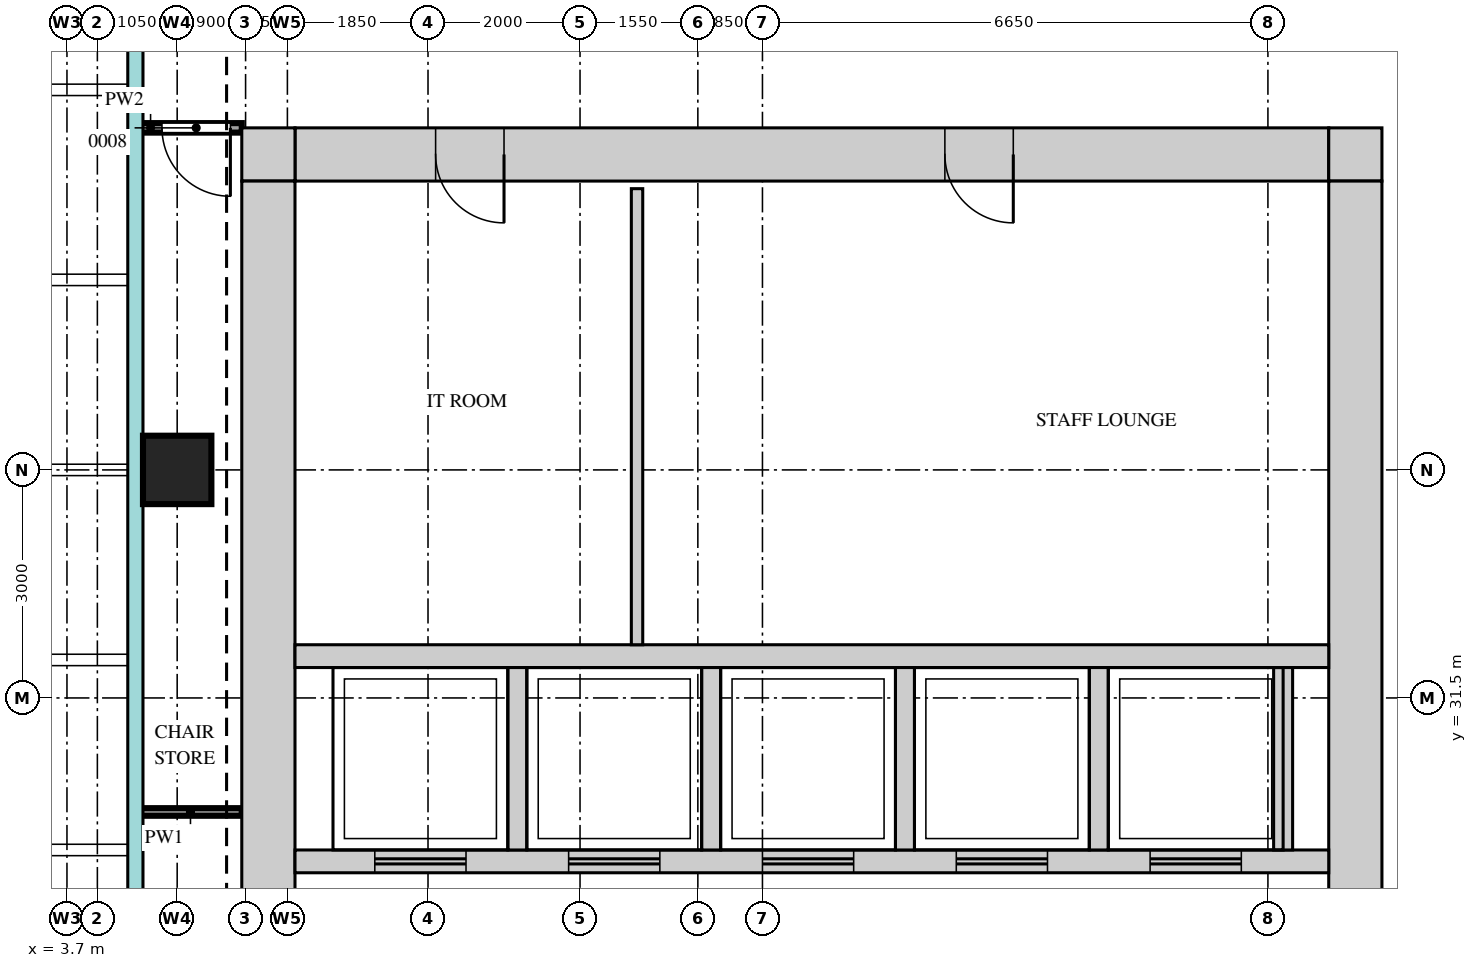
"""IFC4 building model, lengths in metres.
Left out: names, types, materials, properties, quantities, classifications, styles, units other than length and angle.
Written with IfcOpenShell. Run it as: python <this file> out.ifc"""

import sys

from ifc_helpers import new_model, si_unit, direction, frame, frame_2d, origin, origin_2d, place, context, subcontext, project, spatial, rectangle, extrude, source, transform, mapped, element, fill, save


model = new_model("IFC4")
c1 = context("Model", 3, precision=1e-05, world=origin(), true_north=direction((0.0, 1.0)))
c2 = subcontext(c1, "Body", "Model", "MODEL_VIEW")
j1 = project(units=[si_unit("LENGTHUNIT", "METRE"), si_unit("PLANEANGLEUNIT", "RADIAN")], contexts=[c1])
p1 = place(None, origin())
s1 = spatial("IfcSite", under=j1, at=p1, CompositionType="ELEMENT")
p2 = place(p1, origin())
s2 = spatial("IfcBuilding", under=s1, at=p2, CompositionType="ELEMENT")
p3 = place(p2, frame((0.0, 0.0, 258.2)))
s3 = spatial("IfcBuildingStorey", under=s2, at=p3, CompositionType="ELEMENT", Elevation=258.2)
m1 = source(origin(), c2, "Body", "SweptSolid", [
    extrude(rectangle(XDim=13.6, YDim=0.7, at=frame_2d((6.8, 0.0))), origin(), (0.0, 0.0, 1.0), 3.75),
])
p4 = place(p3, frame((6.7, 38.65, 0.0), z_axis=(0.0, 0.0, 1.0), x_axis=(1.0, 0.0, 0.0)))
e1 = element("IfcWall", 1, at=p4, inside=s3, PredefinedType="SHEAR", context=c2, shape_type="MappedRepresentation", body=[
    mapped(m1, transform((0.0, 0.0, 0.0))),
])
m2 = source(origin(), c2, "Body", "SweptSolid", [
    extrude(rectangle(XDim=0.9, YDim=2.1, at=frame_2d((0.45, 1.05))), frame((0.0, 0.36, 0.0), z_axis=(0.0, -1.0, 0.0), x_axis=(1.0, 0.0, 0.0)), (0.0, 0.0, 1.0), 0.72),
])
p5 = place(p4, frame((1.85, 0.0, 0.0)))
e2 = element("IfcOpeningElement", 2, at=p5, cuts=e1, PredefinedType="OPENING", context=c2, shape_type="MappedRepresentation", body=[
    mapped(m2, transform((0.0, 0.0, 0.0))),
])
p6 = place(p4, frame((8.55, 0.0, 0.0)))
e3 = element("IfcOpeningElement", 3, at=p6, cuts=e1, PredefinedType="OPENING", context=c2, shape_type="MappedRepresentation", body=[
    mapped(m2, transform((0.0, 0.0, 0.0))),
])
m3 = source(origin(), c2, "Body", "SweptSolid", [
    extrude(rectangle(XDim=0.7, YDim=0.7, at=frame_2d((0.35, 0.0))), origin(), (0.0, 0.0, 1.0), 3.75),
])
for number, where, z_axis, x_axis in (
    (4, (20.3, 38.65, 0.0), (0.0, 0.0, 1.0), (1.0, 0.0, 0.0)),
    (5, (6.0, 38.65, 0.0), (0.0, 0.0, 1.0), (1.0, 0.0, 0.0)),
):
    element("IfcWall", number, at=place(p3, frame(where, z_axis=z_axis, x_axis=x_axis)), inside=s3, PredefinedType="SHEAR", context=c2, shape_type="MappedRepresentation", body=[
        mapped(m3, transform((0.0, 0.0, 0.0))),
    ])
m4 = source(origin(), c2, "Body", "SweptSolid", [
    extrude(rectangle(XDim=22.6, YDim=0.7, at=frame_2d((11.3, 0.0))), origin(), (0.0, 0.0, 1.0), 3.75),
])
p7 = place(p3, frame((20.65, 15.7, 0.0), z_axis=(0.0, 0.0, 1.0), x_axis=(0.0, 1.0, 0.0)))
e6 = element("IfcWall", 6, at=p7, inside=s3, PredefinedType="SHEAR", context=c2, shape_type="MappedRepresentation", body=[
    mapped(m4, transform((0.0, 0.0, 0.0))),
])
m5 = source(origin(), c2, "Body", "SweptSolid", [
    extrude(rectangle(XDim=1.8, YDim=2.1, at=frame_2d((0.9, 1.05))), frame((0.0, 0.36, 0.0), z_axis=(0.0, -1.0, 0.0), x_axis=(1.0, 0.0, 0.0)), (0.0, 0.0, 1.0), 0.72),
])
p8 = place(p7, frame((10.8, 0.0, 0.0)))
e7 = element("IfcOpeningElement", 7, at=p8, cuts=e6, PredefinedType="OPENING", context=c2, shape_type="MappedRepresentation", body=[
    mapped(m5, transform((0.0, 0.0, 0.0))),
])
p9 = place(p7, frame((0.45, 0.0, 0.0)))
e8 = element("IfcOpeningElement", 8, at=p9, cuts=e6, PredefinedType="OPENING", context=c2, shape_type="MappedRepresentation", body=[
    mapped(m2, transform((0.0, 0.0, 0.0))),
])
p10 = place(p7, frame((2.25, 0.0, 0.0)))
e9 = element("IfcOpeningElement", 9, at=p10, cuts=e6, PredefinedType="OPENING", context=c2, shape_type="MappedRepresentation", body=[
    mapped(m2, transform((0.0, 0.0, 0.0))),
])
m6 = source(origin(), c2, "Body", "SweptSolid", [
    extrude(rectangle(XDim=1.0, YDim=2.1, at=frame_2d((0.5, 1.05))), frame((0.0, 0.36, 0.0), z_axis=(0.0, -1.0, 0.0), x_axis=(1.0, 0.0, 0.0)), (0.0, 0.0, 1.0), 0.72),
])
p11 = place(p7, frame((4.95, 0.0, 0.0)))
e10 = element("IfcOpeningElement", 10, at=p11, cuts=e6, PredefinedType="OPENING", context=c2, shape_type="MappedRepresentation", body=[
    mapped(m6, transform((0.0, 0.0, 0.0))),
])
p12 = place(p3, frame((6.35, 15.7, 0.0), z_axis=(0.0, 0.0, 1.0), x_axis=(0.0, 1.0, 0.0)))
e11 = element("IfcWall", 11, at=p12, inside=s3, PredefinedType="SHEAR", context=c2, shape_type="MappedRepresentation", body=[
    mapped(m4, transform((0.0, 0.0, 0.0))),
])
m7 = source(origin(), c2, "Body", "SweptSolid", [
    extrude(rectangle(XDim=13.6, YDim=0.3, at=frame_2d((6.8, 0.0))), origin(), (0.0, 0.0, 1.0), 3.75),
])
p13 = place(p3, frame((6.7, 32.05, 0.0), z_axis=(0.0, 0.0, 1.0), x_axis=(1.0, 0.0, 0.0)))
e12 = element("IfcWall", 12, at=p13, inside=s3, PredefinedType="STANDARD", context=c2, shape_type="MappedRepresentation", body=[
    mapped(m7, transform((0.0, 0.0, 0.0))),
])
p14 = place(p3, frame((6.7, 29.35, 0.0), z_axis=(0.0, 0.0, 1.0), x_axis=(1.0, 0.0, 0.0)))
e13 = element("IfcWall", 13, at=p14, inside=s3, PredefinedType="STANDARD", context=c2, shape_type="MappedRepresentation", body=[
    mapped(m7, transform((0.0, 0.0, 0.0))),
])
m8 = source(origin(), c2, "Body", "SweptSolid", [
    extrude(rectangle(XDim=1.2, YDim=2.1, at=frame_2d((0.6, 1.05))), frame((0.0, 0.16, 0.0), z_axis=(0.0, -1.0, 0.0), x_axis=(1.0, 0.0, 0.0)), (0.0, 0.0, 1.0), 0.32),
])
p15 = place(p14, frame((1.05, 0.0, 0.0)))
e14 = element("IfcOpeningElement", 14, at=p15, cuts=e13, PredefinedType="OPENING", context=c2, shape_type="MappedRepresentation", body=[
    mapped(m8, transform((0.0, 0.0, 0.0))),
])
p16 = place(p14, frame((3.6, 0.0, 0.0)))
e15 = element("IfcOpeningElement", 15, at=p16, cuts=e13, PredefinedType="OPENING", context=c2, shape_type="MappedRepresentation", body=[
    mapped(m8, transform((0.0, 0.0, 0.0))),
])
p17 = place(p14, frame((6.15, 0.0, 0.0)))
e16 = element("IfcOpeningElement", 16, at=p17, cuts=e13, PredefinedType="OPENING", context=c2, shape_type="MappedRepresentation", body=[
    mapped(m8, transform((0.0, 0.0, 0.0))),
])
p18 = place(p14, frame((8.7, 0.0, 0.0)))
e17 = element("IfcOpeningElement", 17, at=p18, cuts=e13, PredefinedType="OPENING", context=c2, shape_type="MappedRepresentation", body=[
    mapped(m8, transform((0.0, 0.0, 0.0))),
])
p19 = place(p14, frame((11.25, 0.0, 0.0)))
e18 = element("IfcOpeningElement", 18, at=p19, cuts=e13, PredefinedType="OPENING", context=c2, shape_type="MappedRepresentation", body=[
    mapped(m8, transform((0.0, 0.0, 0.0))),
])
m9 = source(origin(), c2, "Body", "SweptSolid", [
    extrude(rectangle(XDim=2.4, YDim=0.25, at=frame_2d((1.2, 0.0))), origin(), (0.0, 0.0, 1.0), 3.75),
])
for number, where, z_axis, x_axis in (
    (19, (17.275, 29.5, 0.0), (0.0, 0.0, 1.0), (0.0, 1.0, 0.0)),
    (20, (19.7, 29.5, 0.0), (0.0, 0.0, 1.0), (0.0, 1.0, 0.0)),
    (21, (9.625, 29.5, 0.0), (0.0, 0.0, 1.0), (0.0, 1.0, 0.0)),
    (22, (12.175, 29.5, 0.0), (0.0, 0.0, 1.0), (0.0, 1.0, 0.0)),
    (23, (14.725, 29.5, 0.0), (0.0, 0.0, 1.0), (0.0, 1.0, 0.0)),
):
    element("IfcWall", number, at=place(p3, frame(where, z_axis=z_axis, x_axis=x_axis)), inside=s3, PredefinedType="STANDARD", context=c2, shape_type="MappedRepresentation", body=[
        mapped(m9, transform((0.0, 0.0, 0.0))),
    ])
m10 = source(origin(), c2, "Body", "SweptSolid", [
    extrude(rectangle(XDim=0.9, YDim=0.9, at=origin_2d()), origin(), (0.0, 0.0, 1.0), 3.75),
])
p20 = place(p3, frame((5.15, 34.5, 0.0), z_axis=(0.0, 0.0, 1.0), x_axis=(1.0, 0.0, 0.0)))
e24 = element("IfcColumn", 24, at=p20, inside=s3, PredefinedType="COLUMN", context=c2, shape_type="MappedRepresentation", body=[
    mapped(m10, transform((0.0, 0.0, 0.0))),
])
m11 = source(origin(), c2, "Body", "SweptSolid", [
    extrude(rectangle(XDim=1.35, YDim=0.1, at=frame_2d((0.675, 0.0))), origin(), (0.0, 0.0, 1.0), 3.8),
])
p21 = place(p3, frame((4.65, 30.0, 0.0), z_axis=(0.0, 0.0, 1.0), x_axis=(1.0, 0.0, 0.0)))
e25 = element("IfcWall", 25, at=p21, inside=s3, PredefinedType="PARTITIONING", context=c2, shape_type="MappedRepresentation", body=[
    mapped(m11, transform((0.0, 0.0, 0.0))),
])
m12 = source(origin(), c2, "Body", "SweptSolid", [
    extrude(rectangle(XDim=6.0, YDim=0.15, at=frame_2d((3.0, 0.0))), origin(), (0.0, 0.0, 1.0), 3.8),
])
p22 = place(p3, frame((11.2, 32.2, 0.0), z_axis=(0.0, 0.0, 1.0), x_axis=(0.0, 1.0, 0.0)))
e26 = element("IfcWall", 26, at=p22, inside=s3, PredefinedType="PARTITIONING", context=c2, shape_type="MappedRepresentation", body=[
    mapped(m12, transform((0.0, 0.0, 0.0))),
])
m13 = source(origin(), c2, "Body", "SweptSolid", [
    extrude(rectangle(XDim=1.35, YDim=0.125, at=frame_2d((0.675, 0.0))), origin(), (0.0, 0.0, 1.0), 3.8),
])
p23 = place(p3, frame((4.65, 39.0, 0.0), z_axis=(0.0, 0.0, 1.0), x_axis=(1.0, 0.0, 0.0)))
e27 = element("IfcWall", 27, at=p23, inside=s3, PredefinedType="PARTITIONING", context=c2, shape_type="MappedRepresentation", body=[
    mapped(m13, transform((0.0, 0.0, 0.0))),
])
m14 = source(origin(), c2, "Body", "SweptSolid", [
    extrude(rectangle(XDim=0.9, YDim=2.1, at=frame_2d((0.45, 1.05))), frame((0.0, 0.073, 0.0), z_axis=(0.0, -1.0, 0.0), x_axis=(1.0, 0.0, 0.0)), (0.0, 0.0, 1.0), 0.145),
])
p24 = place(p23, frame((0.3, 0.0, 0.0)))
e28 = element("IfcOpeningElement", 28, at=p24, cuts=e27, PredefinedType="OPENING", context=c2, shape_type="MappedRepresentation", body=[
    mapped(m14, transform((0.0, 0.0, 0.0))),
])
m15 = source(origin(), c2, "Body", "SweptSolid", [
    extrude(rectangle(XDim=0.9, YDim=2.1, at=frame_2d((0.45, 1.05))), frame((0.0, 0.3, 0.0), z_axis=(0.0, -1.0, 0.0), x_axis=(1.0, 0.0, 0.0)), (0.0, 0.0, 1.0), 0.6),
])
p25 = place(p5, origin())
e29 = element("IfcDoor", 29, at=p25, inside=s3, OperationType="SINGLE_SWING_RIGHT", PredefinedType="DOOR", context=c2, shape_type="MappedRepresentation", body=[
    mapped(m15, transform((0.0, 0.0, 0.0))),
])
fill(e2, e29)
p26 = place(p6, origin())
e30 = element("IfcDoor", 30, at=p26, inside=s3, OperationType="SINGLE_SWING_RIGHT", PredefinedType="DOOR", context=c2, shape_type="MappedRepresentation", body=[
    mapped(m15, transform((0.0, 0.0, 0.0))),
])
fill(e3, e30)
m16 = source(origin(), c2, "Body", "SweptSolid", [
    extrude(rectangle(XDim=0.9, YDim=2.1, at=frame_2d((0.45, 1.05))), frame((0.0, 0.025, 0.0), z_axis=(0.0, -1.0, 0.0), x_axis=(1.0, 0.0, 0.0)), (0.0, 0.0, 1.0), 0.05),
])
p27 = place(p24, origin())
e31 = element("IfcDoor", 31, at=p27, inside=s3, OperationType="SINGLE_SWING_RIGHT", PredefinedType="DOOR", context=c2, shape_type="MappedRepresentation", body=[
    mapped(m16, transform((0.0, 0.0, 0.0))),
])
fill(e28, e31)
m17 = source(origin(), c2, "Body", "SweptSolid", [
    extrude(rectangle(XDim=1.2, YDim=2.1, at=frame_2d((0.6, 1.05))), frame((0.0, 0.025, 0.0), z_axis=(0.0, -1.0, 0.0), x_axis=(1.0, 0.0, 0.0)), (0.0, 0.0, 1.0), 0.05),
])
p28 = place(p15, origin())
e32 = element("IfcDoor", 32, at=p28, inside=s3, OperationType="DOUBLE_DOOR_SLIDING", PredefinedType="DOOR", context=c2, shape_type="MappedRepresentation", body=[
    mapped(m17, transform((0.0, 0.0, 0.0))),
])
fill(e14, e32)
p29 = place(p16, origin())
e33 = element("IfcDoor", 33, at=p29, inside=s3, OperationType="DOUBLE_DOOR_SLIDING", PredefinedType="DOOR", context=c2, shape_type="MappedRepresentation", body=[
    mapped(m17, transform((0.0, 0.0, 0.0))),
])
fill(e15, e33)
p30 = place(p17, origin())
e34 = element("IfcDoor", 34, at=p30, inside=s3, OperationType="DOUBLE_DOOR_SLIDING", PredefinedType="DOOR", context=c2, shape_type="MappedRepresentation", body=[
    mapped(m17, transform((0.0, 0.0, 0.0))),
])
fill(e16, e34)
p31 = place(p18, origin())
e35 = element("IfcDoor", 35, at=p31, inside=s3, OperationType="DOUBLE_DOOR_SLIDING", PredefinedType="DOOR", context=c2, shape_type="MappedRepresentation", body=[
    mapped(m17, transform((0.0, 0.0, 0.0))),
])
fill(e17, e35)
p32 = place(p19, origin())
e36 = element("IfcDoor", 36, at=p32, inside=s3, OperationType="DOUBLE_DOOR_SLIDING", PredefinedType="DOOR", context=c2, shape_type="MappedRepresentation", body=[
    mapped(m17, transform((0.0, 0.0, 0.0))),
])
fill(e18, e36)
save(model, sys.argv[1])
